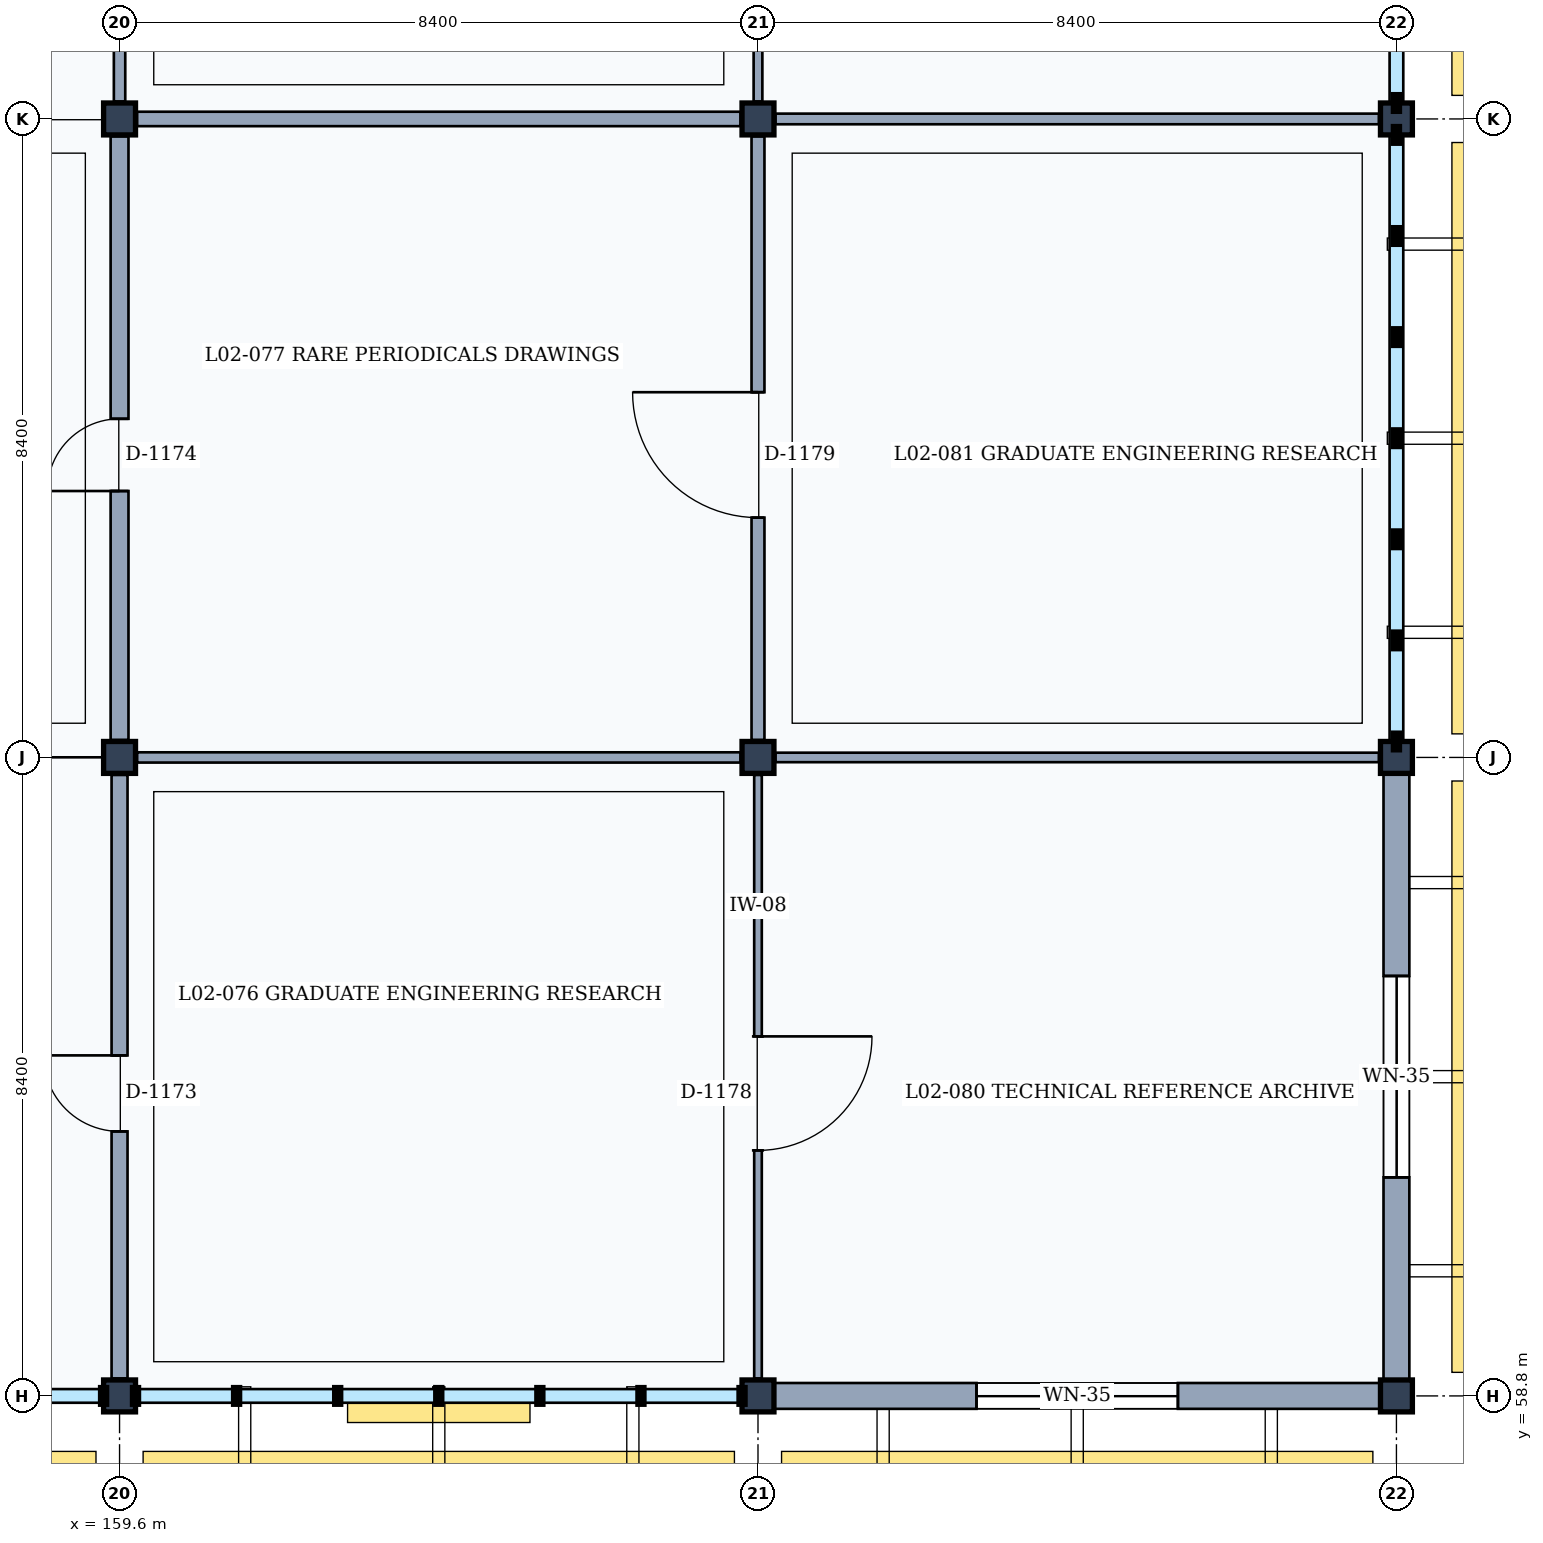
"""IFC4 building model, lengths in metres.
Left out: names, types, materials, properties, quantities, classifications, styles, units other than length and angle.
Written with IfcOpenShell. Run it as: python <this file> out.ifc"""

import sys

from ifc_helpers import new_model, si_unit, direction, frame, frame_2d, origin, origin_2d, place, context, subcontext, project, spatial, rectangle, extrude, element, fill, save


model = new_model("IFC4")
c1 = context("Model", 3, precision=1e-05, world=origin(), true_north=direction((0.0, 1.0)))
c2 = subcontext(c1, "Body", "Model", "MODEL_VIEW")
j1 = project(units=[si_unit("LENGTHUNIT", "METRE"), si_unit("PLANEANGLEUNIT", "RADIAN")], contexts=[c1])
p1 = place(None, origin())
s1 = spatial("IfcSite", under=j1, at=p1, CompositionType="ELEMENT")
p2 = place(p1, origin())
s2 = spatial("IfcBuilding", under=s1, at=p2, CompositionType="ELEMENT")
p3 = place(p2, frame((0.0, 0.0, 9.6)))
s3 = spatial("IfcBuildingStorey", under=s2, at=p3, CompositionType="ELEMENT", Elevation=9.6)
for number, where, z_axis, x_axis in (
    (1, (159.6, 58.8, 0.0), (0.0, 0.0, 1.0), (1.0, 0.0, 0.0)),
    (2, (159.6, 67.2, 0.0), (0.0, 0.0, 1.0), (1.0, 0.0, 0.0)),
    (3, (159.6, 75.6, 0.0), (0.0, 0.0, 1.0), (1.0, 0.0, 0.0)),
    (4, (168.0, 58.8, 0.0), (0.0, 0.0, 1.0), (1.0, 0.0, 0.0)),
    (5, (168.0, 67.2, 0.0), (0.0, 0.0, 1.0), (1.0, 0.0, 0.0)),
    (6, (168.0, 75.6, 0.0), (0.0, 0.0, 1.0), (1.0, 0.0, 0.0)),
    (7, (176.4, 58.8, 0.0), (0.0, 0.0, 1.0), (1.0, 0.0, 0.0)),
    (8, (176.4, 67.2, 0.0), (0.0, 0.0, 1.0), (1.0, 0.0, 0.0)),
    (9, (176.4, 75.6, 0.0), (0.0, 0.0, 1.0), (1.0, 0.0, 0.0)),
):
    element("IfcColumn", number, at=place(p3, frame(where, z_axis=z_axis, x_axis=x_axis)), inside=s3, PredefinedType="COLUMN", context=c2, shape_type="SweptSolid", body=[
        extrude(rectangle(XDim=0.42, YDim=0.42, at=origin_2d()), origin(), (0.0, 0.0, 1.0), 4.2),
    ])
p4 = place(p3, frame((176.19, 58.8, 0.0), z_axis=(0.0, 0.0, 1.0), x_axis=(-1.0, 0.0, 0.0)))
e10 = element("IfcWall", 10, at=p4, inside=s3, PredefinedType="SOLIDWALL", context=c2, shape_type="SweptSolid", body=[
    extrude(rectangle(XDim=7.98, YDim=0.34, at=frame_2d((3.99, 0.0))), origin(), (0.0, 0.0, 1.0), 3.36),
])
p5 = place(p4, frame((2.665, 0.0, 0.9)))
e11 = element("IfcOpeningElement", 11, at=p5, cuts=e10, PredefinedType="OPENING", context=c2, shape_type="SweptSolid", body=[
    extrude(rectangle(XDim=2.65, YDim=1.8, at=frame_2d((1.325, 0.9))), frame((0.0, 0.18, 0.0), z_axis=(0.0, -1.0, 0.0), x_axis=(1.0, 0.0, 0.0)), (0.0, 0.0, 1.0), 0.36),
])
p6 = place(p3, frame((176.4, 66.99, 0.0), z_axis=(0.0, 0.0, 1.0), x_axis=(0.0, -1.0, 0.0)))
e12 = element("IfcWall", 12, at=p6, inside=s3, PredefinedType="SOLIDWALL", context=c2, shape_type="SweptSolid", body=[
    extrude(rectangle(XDim=7.98, YDim=0.34, at=frame_2d((3.99, 0.0))), origin(), (0.0, 0.0, 1.0), 3.36),
])
p7 = place(p6, frame((2.665, 0.0, 0.9)))
e13 = element("IfcOpeningElement", 13, at=p7, cuts=e12, PredefinedType="OPENING", context=c2, shape_type="SweptSolid", body=[
    extrude(rectangle(XDim=2.65, YDim=1.8, at=frame_2d((1.325, 0.9))), frame((0.0, 0.18, 0.0), z_axis=(0.0, -1.0, 0.0), x_axis=(1.0, 0.0, 0.0)), (0.0, 0.0, 1.0), 0.36),
])
p8 = place(p3, frame((159.6, 59.03, 0.0), z_axis=(0.0, 0.0, 1.0), x_axis=(0.0, 1.0, 0.0)))
e14 = element("IfcWall", 14, at=p8, inside=s3, PredefinedType="PARTITIONING", context=c2, shape_type="SweptSolid", body=[
    extrude(rectangle(XDim=7.94, YDim=0.21, at=frame_2d((3.97, 0.0))), origin(), (0.0, 0.0, 1.0), 3.32),
])
p9 = place(p8, frame((3.25, 0.0, 0.0)))
e15 = element("IfcOpeningElement", 15, at=p9, cuts=e14, PredefinedType="OPENING", context=c2, shape_type="SweptSolid", body=[
    extrude(rectangle(XDim=1.0, YDim=2.15, at=frame_2d((0.5, 1.075))), frame((0.0, 0.115, 0.0), z_axis=(0.0, -1.0, 0.0), x_axis=(1.0, 0.0, 0.0)), (0.0, 0.0, 1.0), 0.23),
])
p10 = place(p3, frame((159.6, 67.43, 0.0), z_axis=(0.0, 0.0, 1.0), x_axis=(0.0, 1.0, 0.0)))
e16 = element("IfcWall", 16, at=p10, inside=s3, PredefinedType="PARTITIONING", context=c2, shape_type="SweptSolid", body=[
    extrude(rectangle(XDim=7.94, YDim=0.235, at=frame_2d((3.97, 0.0))), origin(), (0.0, 0.0, 1.0), 3.32),
])
p11 = place(p10, frame((3.275, 0.0, 0.0)))
e17 = element("IfcOpeningElement", 17, at=p11, cuts=e16, PredefinedType="OPENING", context=c2, shape_type="SweptSolid", body=[
    extrude(rectangle(XDim=0.95, YDim=2.15, at=frame_2d((0.475, 1.075))), frame((0.0, 0.127, 0.0), z_axis=(0.0, -1.0, 0.0), x_axis=(1.0, 0.0, 0.0)), (0.0, 0.0, 1.0), 0.255),
])
p12 = place(p3, frame((159.6, 75.83, 0.0), z_axis=(0.0, 0.0, 1.0), x_axis=(0.0, 1.0, 0.0)))
e18 = element("IfcWall", 18, at=p12, inside=s3, PredefinedType="PARTITIONING", context=c2, shape_type="SweptSolid", body=[
    extrude(rectangle(XDim=7.94, YDim=0.15, at=frame_2d((3.97, 0.0))), origin(), (0.0, 0.0, 1.0), 3.32),
])
p13 = place(p12, frame((2.85, 0.0, 0.0)))
e19 = element("IfcOpeningElement", 19, at=p13, cuts=e18, PredefinedType="OPENING", context=c2, shape_type="SweptSolid", body=[
    extrude(rectangle(XDim=1.8, YDim=2.3, at=frame_2d((0.9, 1.15))), frame((0.0, 0.085, 0.0), z_axis=(0.0, -1.0, 0.0), x_axis=(1.0, 0.0, 0.0)), (0.0, 0.0, 1.0), 0.17),
])
p14 = place(p3, frame((168.0, 59.03, 0.0), z_axis=(0.0, 0.0, 1.0), x_axis=(0.0, 1.0, 0.0)))
e20 = element("IfcWall", 20, at=p14, inside=s3, PredefinedType="MOVABLE", context=c2, shape_type="SweptSolid", body=[
    extrude(rectangle(XDim=7.94, YDim=0.1, at=frame_2d((3.97, 0.0))), origin(), (0.0, 0.0, 1.0), 3.32),
])
p15 = place(p14, frame((3.0, 0.0, 0.0)))
e21 = element("IfcOpeningElement", 21, at=p15, cuts=e20, PredefinedType="OPENING", context=c2, shape_type="SweptSolid", body=[
    extrude(rectangle(XDim=1.5, YDim=2.3, at=frame_2d((0.75, 1.15))), frame((0.0, 0.06, 0.0), z_axis=(0.0, -1.0, 0.0), x_axis=(1.0, 0.0, 0.0)), (0.0, 0.0, 1.0), 0.12),
])
p16 = place(p3, frame((159.83, 67.2, 0.0), z_axis=(0.0, 0.0, 1.0), x_axis=(1.0, 0.0, 0.0)))
e22 = element("IfcWall", 22, at=p16, inside=s3, PredefinedType="PARTITIONING", context=c2, shape_type="SweptSolid", body=[
    extrude(rectangle(XDim=7.94, YDim=0.135, at=frame_2d((3.97, 0.0))), origin(), (0.0, 0.0, 1.0), 3.24),
])
p17 = place(p3, frame((168.0, 67.43, 0.0), z_axis=(0.0, 0.0, 1.0), x_axis=(0.0, 1.0, 0.0)))
e23 = element("IfcWall", 23, at=p17, inside=s3, PredefinedType="PARTITIONING", context=c2, shape_type="SweptSolid", body=[
    extrude(rectangle(XDim=7.94, YDim=0.17, at=frame_2d((3.97, 0.0))), origin(), (0.0, 0.0, 1.0), 3.32),
])
p18 = place(p17, frame((2.925, 0.0, 0.0)))
e24 = element("IfcOpeningElement", 24, at=p18, cuts=e23, PredefinedType="OPENING", context=c2, shape_type="SweptSolid", body=[
    extrude(rectangle(XDim=1.65, YDim=2.25, at=frame_2d((0.825, 1.125))), frame((0.0, 0.095, 0.0), z_axis=(0.0, -1.0, 0.0), x_axis=(1.0, 0.0, 0.0)), (0.0, 0.0, 1.0), 0.19),
])
p19 = place(p3, frame((159.83, 75.6, 0.0), z_axis=(0.0, 0.0, 1.0), x_axis=(1.0, 0.0, 0.0)))
e25 = element("IfcWall", 25, at=p19, inside=s3, PredefinedType="PARTITIONING", context=c2, shape_type="SweptSolid", body=[
    extrude(rectangle(XDim=7.94, YDim=0.19, at=frame_2d((3.97, 0.0))), origin(), (0.0, 0.0, 1.0), 3.24),
])
p20 = place(p3, frame((168.0, 75.83, 0.0), z_axis=(0.0, 0.0, 1.0), x_axis=(0.0, 1.0, 0.0)))
e26 = element("IfcWall", 26, at=p20, inside=s3, PredefinedType="PARTITIONING", context=c2, shape_type="SweptSolid", body=[
    extrude(rectangle(XDim=7.94, YDim=0.115, at=frame_2d((3.97, 0.0))), origin(), (0.0, 0.0, 1.0), 3.32),
])
p21 = place(p20, frame((3.225, 0.0, 0.0)))
e27 = element("IfcOpeningElement", 27, at=p21, cuts=e26, PredefinedType="OPENING", context=c2, shape_type="SweptSolid", body=[
    extrude(rectangle(XDim=1.05, YDim=2.2, at=frame_2d((0.525, 1.1))), frame((0.0, 0.067, 0.0), z_axis=(0.0, -1.0, 0.0), x_axis=(1.0, 0.0, 0.0)), (0.0, 0.0, 1.0), 0.135),
])
p22 = place(p3, frame((168.23, 67.2, 0.0), z_axis=(0.0, 0.0, 1.0), x_axis=(1.0, 0.0, 0.0)))
e28 = element("IfcWall", 28, at=p22, inside=s3, PredefinedType="PARTITIONING", context=c2, shape_type="SweptSolid", body=[
    extrude(rectangle(XDim=7.94, YDim=0.125, at=frame_2d((3.97, 0.0))), origin(), (0.0, 0.0, 1.0), 3.24),
])
p23 = place(p3, frame((168.23, 75.6, 0.0), z_axis=(0.0, 0.0, 1.0), x_axis=(1.0, 0.0, 0.0)))
e29 = element("IfcWall", 29, at=p23, inside=s3, PredefinedType="PARTITIONING", context=c2, shape_type="SweptSolid", body=[
    extrude(rectangle(XDim=7.94, YDim=0.14, at=frame_2d((3.97, 0.0))), origin(), (0.0, 0.0, 1.0), 3.24),
])
p24 = place(p5, origin())
e30 = element("IfcWindow", 30, at=p24, inside=s3, PartitioningType="SINGLE_PANEL", PredefinedType="WINDOW", context=c2, shape_type="SweptSolid", body=[
    extrude(rectangle(XDim=2.65, YDim=1.8, at=frame_2d((1.325, 0.9))), frame((0.0, 0.03, 0.0), z_axis=(0.0, -1.0, 0.0), x_axis=(1.0, 0.0, 0.0)), (0.0, 0.0, 1.0), 0.06),
])
fill(e11, e30)
p25 = place(p7, origin())
e31 = element("IfcWindow", 31, at=p25, inside=s3, PartitioningType="SINGLE_PANEL", PredefinedType="WINDOW", context=c2, shape_type="SweptSolid", body=[
    extrude(rectangle(XDim=2.65, YDim=1.8, at=frame_2d((1.325, 0.9))), frame((0.0, 0.03, 0.0), z_axis=(0.0, -1.0, 0.0), x_axis=(1.0, 0.0, 0.0)), (0.0, 0.0, 1.0), 0.06),
])
fill(e13, e31)
p26 = place(p9, origin())
e32 = element("IfcDoor", 32, at=p26, inside=s3, OperationType="SINGLE_SWING_RIGHT", PredefinedType="DOOR", context=c2, shape_type="SweptSolid", body=[
    extrude(rectangle(XDim=1.0, YDim=2.15, at=frame_2d((0.5, 1.075))), frame((0.0, 0.025, 0.0), z_axis=(0.0, -1.0, 0.0), x_axis=(1.0, 0.0, 0.0)), (0.0, 0.0, 1.0), 0.05),
])
fill(e15, e32)
p27 = place(p11, origin())
e33 = element("IfcDoor", 33, at=p27, inside=s3, OperationType="SINGLE_SWING_LEFT", PredefinedType="DOOR", context=c2, shape_type="SweptSolid", body=[
    extrude(rectangle(XDim=0.95, YDim=2.15, at=frame_2d((0.475, 1.075))), frame((0.0, 0.025, 0.0), z_axis=(0.0, -1.0, 0.0), x_axis=(1.0, 0.0, 0.0)), (0.0, 0.0, 1.0), 0.05),
])
fill(e17, e33)
p28 = place(p15, frame((1.5, 0.0, 0.0), z_axis=(0.0, 0.0, 1.0), x_axis=(-1.0, 0.0, 0.0)))
e34 = element("IfcDoor", 34, at=p28, inside=s3, OperationType="SINGLE_SWING_LEFT", PredefinedType="DOOR", context=c2, shape_type="SweptSolid", body=[
    extrude(rectangle(XDim=1.5, YDim=2.3, at=frame_2d((0.75, 1.15))), frame((0.0, 0.025, 0.0), z_axis=(0.0, -1.0, 0.0), x_axis=(1.0, 0.0, 0.0)), (0.0, 0.0, 1.0), 0.05),
])
fill(e21, e34)
p29 = place(p18, origin())
e35 = element("IfcDoor", 35, at=p29, inside=s3, OperationType="SINGLE_SWING_RIGHT", PredefinedType="DOOR", context=c2, shape_type="SweptSolid", body=[
    extrude(rectangle(XDim=1.65, YDim=2.25, at=frame_2d((0.825, 1.125))), frame((0.0, 0.025, 0.0), z_axis=(0.0, -1.0, 0.0), x_axis=(1.0, 0.0, 0.0)), (0.0, 0.0, 1.0), 0.05),
])
fill(e24, e35)
save(model, sys.argv[1])
